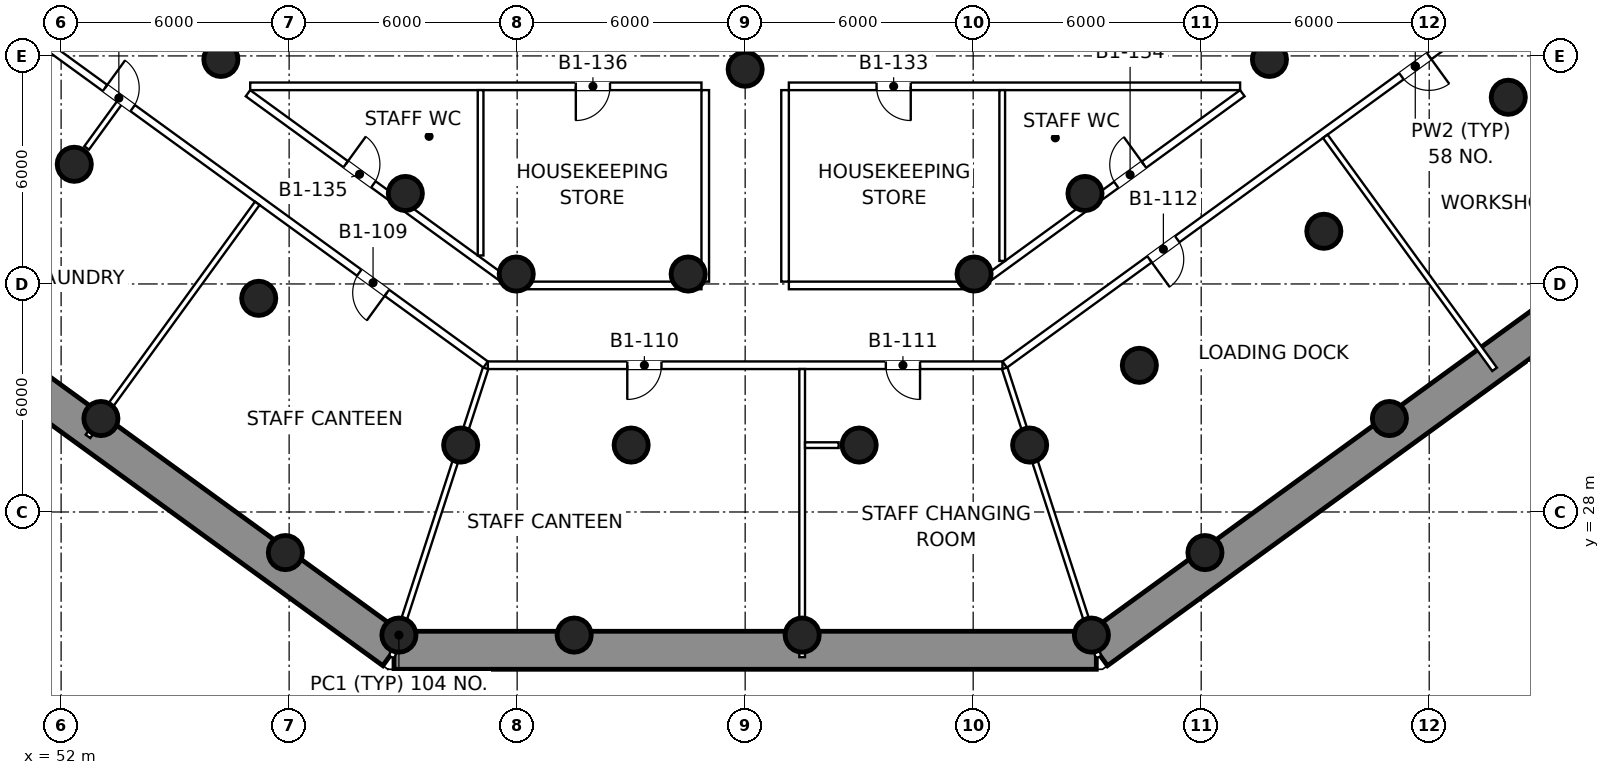
"""IFC4 building model, lengths in metres.
Left out: names, types, materials, properties, quantities, classifications, styles, units other than length and angle.
Written with IfcOpenShell. Run it as: python <this file> out.ifc"""

import sys

from ifc_helpers import new_model, si_unit, direction, frame, frame_2d, origin, origin_2d, place, context, subcontext, project, spatial, rectangle, circle, extrude, element, fill, save


model = new_model("IFC4")
c1 = context("Model", 3, precision=1e-05, world=origin(), true_north=direction((0.0, 1.0)))
c2 = subcontext(c1, "Body", "Model", "MODEL_VIEW")
j1 = project(units=[si_unit("LENGTHUNIT", "METRE"), si_unit("PLANEANGLEUNIT", "RADIAN")], contexts=[c1])
p1 = place(None, origin())
s1 = spatial("IfcSite", under=j1, at=p1, CompositionType="ELEMENT")
p2 = place(p1, origin())
s2 = spatial("IfcBuilding", under=s1, at=p2, CompositionType="ELEMENT")
p3 = place(p2, frame((0.0, 0.0, -5.0)))
s3 = spatial("IfcBuildingStorey", under=s2, at=p3, CompositionType="ELEMENT", Elevation=-5.0)
p4 = place(p3, frame((104.844, 42.963, 0.0), z_axis=(0.0, 0.0, 1.0), x_axis=(-0.809018883304, -0.587782652396, 0.0)))
e1 = element("IfcWall", 1, at=p4, inside=s3, PredefinedType="SOLIDWALL", context=c2, shape_type="SweptSolid", body=[
    extrude(rectangle(XDim=31.647, YDim=1.0, at=frame_2d((15.823, 0.0))), origin(), (0.0, 0.0, 1.0), 4.55),
])
p5 = place(p3, frame((79.24, 24.361, 0.0), z_axis=(0.0, 0.0, 1.0), x_axis=(-1.0, 0.0, 0.0)))
e2 = element("IfcWall", 2, at=p5, inside=s3, PredefinedType="SOLIDWALL", context=c2, shape_type="SweptSolid", body=[
    extrude(rectangle(XDim=18.481, YDim=1.0, at=frame_2d((9.24, 0.0))), origin(), (0.0, 0.0, 1.0), 4.55),
])
p6 = place(p3, frame((60.76, 24.361, 0.0), z_axis=(0.0, 0.0, 1.0), x_axis=(-0.809018883304, 0.587782652396, 0.0)))
e3 = element("IfcWall", 3, at=p6, inside=s3, PredefinedType="SOLIDWALL", context=c2, shape_type="SweptSolid", body=[
    extrude(rectangle(XDim=31.647, YDim=1.0, at=frame_2d((15.823, 0.0))), origin(), (0.0, 0.0, 1.0), 4.55),
])
for number, where, z_axis, x_axis in (
    (4, (70.0, 39.65, 0.0), (0.0, 0.0, 1.0), (1.0, 0.0, 0.0)),
    (5, (53.047, 30.459, 0.0), (0.0, 0.0, 1.0), (1.0, 0.0, 0.0)),
    (6, (57.901, 26.932, 0.0), (0.0, 0.0, 1.0), (1.0, 0.0, 0.0)),
    (7, (60.889, 24.761, 0.0), (0.0, 0.0, 1.0), (1.0, 0.0, 0.0)),
    (8, (65.5, 24.761, 0.0), (0.0, 0.0, 1.0), (1.0, 0.0, 0.0)),
    (9, (71.5, 24.761, 0.0), (0.0, 0.0, 1.0), (1.0, 0.0, 0.0)),
    (10, (79.111, 24.761, 0.0), (0.0, 0.0, 1.0), (1.0, 0.0, 0.0)),
    (11, (82.099, 26.932, 0.0), (0.0, 0.0, 1.0), (1.0, 0.0, 0.0)),
    (12, (86.953, 30.459, 0.0), (0.0, 0.0, 1.0), (1.0, 0.0, 0.0)),
    (13, (52.346, 37.149, 0.0), (0.0, 0.0, 1.0), (1.0, 0.0, 0.0)),
    (14, (57.2, 33.622, 0.0), (0.0, 0.0, 1.0), (1.0, 0.0, 0.0)),
    (15, (62.514, 29.761, 0.0), (0.0, 0.0, 1.0), (1.0, 0.0, 0.0)),
    (16, (67.0, 29.761, 0.0), (0.0, 0.0, 1.0), (1.0, 0.0, 0.0)),
    (17, (73.0, 29.761, 0.0), (0.0, 0.0, 1.0), (1.0, 0.0, 0.0)),
    (18, (77.486, 29.761, 0.0), (0.0, 0.0, 1.0), (1.0, 0.0, 0.0)),
    (19, (80.373, 31.859, 0.0), (0.0, 0.0, 1.0), (1.0, 0.0, 0.0)),
    (20, (85.227, 35.386, 0.0), (0.0, 0.0, 1.0), (1.0, 0.0, 0.0)),
    (21, (90.081, 38.912, 0.0), (0.0, 0.0, 1.0), (1.0, 0.0, 0.0)),
    (22, (56.204, 39.908, 0.0), (0.0, 0.0, 1.0), (1.0, 0.0, 0.0)),
    (23, (61.058, 36.381, 0.0), (0.0, 0.0, 1.0), (1.0, 0.0, 0.0)),
    (24, (63.976, 34.261, 0.0), (0.0, 0.0, 1.0), (1.0, 0.0, 0.0)),
    (25, (68.5, 34.261, 0.0), (0.0, 0.0, 1.0), (1.0, 0.0, 0.0)),
    (26, (76.024, 34.261, 0.0), (0.0, 0.0, 1.0), (1.0, 0.0, 0.0)),
    (27, (78.942, 36.381, 0.0), (0.0, 0.0, 1.0), (1.0, 0.0, 0.0)),
    (28, (83.796, 39.908, 0.0), (0.0, 0.0, 1.0), (1.0, 0.0, 0.0)),
):
    element("IfcColumn", number, at=place(p3, frame(where, z_axis=z_axis, x_axis=x_axis)), inside=s3, PredefinedType="COLUMN", context=c2, shape_type="SweptSolid", body=[
        extrude(circle(Radius=0.45, at=origin_2d()), origin(), (0.0, 0.0, 1.0), 5.0),
    ])
p7 = place(p3, frame((98.437, 47.579, 0.0), z_axis=(0.0, 0.0, 1.0), x_axis=(-0.809016646189, -0.587785731529, 0.0)))
e29 = element("IfcWall", 29, at=p7, inside=s3, PredefinedType="PARTITIONING", context=c2, shape_type="SweptSolid", body=[
    extrude(rectangle(XDim=26.708, YDim=0.2, at=frame_2d((13.354, 0.0))), origin(), (0.0, 0.0, 1.0), 4.55),
])
p8 = place(p7, frame((21.097, 0.0, 0.0)))
e30 = element("IfcOpeningElement", 30, at=p8, cuts=e29, PredefinedType="OPENING", context=c2, shape_type="SweptSolid", body=[
    extrude(rectangle(XDim=0.9, YDim=2.1, at=frame_2d((0.45, 1.05))), frame((0.0, 0.11, 0.0), z_axis=(0.0, -1.0, 0.0), x_axis=(1.0, 0.0, 0.0)), (0.0, 0.0, 1.0), 0.22),
])
p9 = place(p7, frame((12.904, 0.0, 0.0)))
e31 = element("IfcOpeningElement", 31, at=p9, cuts=e29, PredefinedType="OPENING", context=c2, shape_type="SweptSolid", body=[
    extrude(rectangle(XDim=0.9, YDim=2.1, at=frame_2d((0.45, 1.05))), frame((0.0, 0.11, 0.0), z_axis=(0.0, -1.0, 0.0), x_axis=(1.0, 0.0, 0.0)), (0.0, 0.0, 1.0), 0.22),
])
p10 = place(p7, frame((6.904, 0.0, 0.0)))
e32 = element("IfcOpeningElement", 32, at=p10, cuts=e29, PredefinedType="OPENING", context=c2, shape_type="SweptSolid", body=[
    extrude(rectangle(XDim=0.9, YDim=2.1, at=frame_2d((0.45, 1.05))), frame((0.0, 0.11, 0.0), z_axis=(0.0, -1.0, 0.0), x_axis=(1.0, 0.0, 0.0)), (0.0, 0.0, 1.0), 0.22),
])
p11 = place(p7, frame((1.711, 0.0, 0.0)))
e33 = element("IfcOpeningElement", 33, at=p11, cuts=e29, PredefinedType="OPENING", context=c2, shape_type="SweptSolid", body=[
    extrude(rectangle(XDim=0.9, YDim=2.1, at=frame_2d((0.45, 1.05))), frame((0.0, 0.11, 0.0), z_axis=(0.0, -1.0, 0.0), x_axis=(1.0, 0.0, 0.0)), (0.0, 0.0, 1.0), 0.22),
])
p12 = place(p3, frame((76.771, 31.861, 0.0), z_axis=(0.0, 0.0, 1.0), x_axis=(-1.0, 0.0, 0.0)))
e34 = element("IfcWall", 34, at=p12, inside=s3, PredefinedType="PARTITIONING", context=c2, shape_type="SweptSolid", body=[
    extrude(rectangle(XDim=13.542, YDim=0.2, at=frame_2d((6.771, 0.0))), origin(), (0.0, 0.0, 1.0), 4.55),
])
p13 = place(p12, frame((8.973, 0.0, 0.0)))
e35 = element("IfcOpeningElement", 35, at=p13, cuts=e34, PredefinedType="OPENING", context=c2, shape_type="SweptSolid", body=[
    extrude(rectangle(XDim=0.9, YDim=2.1, at=frame_2d((0.45, 1.05))), frame((0.0, 0.11, 0.0), z_axis=(0.0, -1.0, 0.0), x_axis=(1.0, 0.0, 0.0)), (0.0, 0.0, 1.0), 0.22),
])
p14 = place(p12, frame((2.169, 0.0, 0.0)))
e36 = element("IfcOpeningElement", 36, at=p14, cuts=e34, PredefinedType="OPENING", context=c2, shape_type="SweptSolid", body=[
    extrude(rectangle(XDim=0.9, YDim=2.1, at=frame_2d((0.45, 1.05))), frame((0.0, 0.11, 0.0), z_axis=(0.0, -1.0, 0.0), x_axis=(1.0, 0.0, 0.0)), (0.0, 0.0, 1.0), 0.22),
])
p15 = place(p3, frame((63.17, 31.88, 0.0), z_axis=(0.0, 0.0, 1.0), x_axis=(-0.809016646189, 0.587785731529, 0.0)))
e37 = element("IfcWall", 37, at=p15, inside=s3, PredefinedType="PARTITIONING", context=c2, shape_type="SweptSolid", body=[
    extrude(rectangle(XDim=26.708, YDim=0.2, at=frame_2d((13.354, 0.0))), origin(), (0.0, 0.0, 1.0), 4.55),
])
p16 = place(p15, frame((21.097, 0.0, 0.0)))
e38 = element("IfcOpeningElement", 38, at=p16, cuts=e37, PredefinedType="OPENING", context=c2, shape_type="SweptSolid", body=[
    extrude(rectangle(XDim=0.9, YDim=2.1, at=frame_2d((0.45, 1.05))), frame((0.0, 0.11, 0.0), z_axis=(0.0, -1.0, 0.0), x_axis=(1.0, 0.0, 0.0)), (0.0, 0.0, 1.0), 0.22),
])
p17 = place(p15, frame((11.479, 0.0, 0.0)))
e39 = element("IfcOpeningElement", 39, at=p17, cuts=e37, PredefinedType="OPENING", context=c2, shape_type="SweptSolid", body=[
    extrude(rectangle(XDim=0.9, YDim=2.1, at=frame_2d((0.45, 1.05))), frame((0.0, 0.11, 0.0), z_axis=(0.0, -1.0, 0.0), x_axis=(1.0, 0.0, 0.0)), (0.0, 0.0, 1.0), 0.22),
])
p18 = place(p15, frame((3.211, 0.0, 0.0)))
e40 = element("IfcOpeningElement", 40, at=p18, cuts=e37, PredefinedType="OPENING", context=c2, shape_type="SweptSolid", body=[
    extrude(rectangle(XDim=0.9, YDim=2.1, at=frame_2d((0.45, 1.05))), frame((0.0, 0.11, 0.0), z_axis=(0.0, -1.0, 0.0), x_axis=(1.0, 0.0, 0.0)), (0.0, 0.0, 1.0), 0.22),
])
p19 = place(p3, frame((76.148, 33.98, 0.0), z_axis=(0.0, 0.0, 1.0), x_axis=(0.809015553327, 0.58778723572, 0.0)))
e41 = element("IfcWall", 41, at=p19, inside=s3, PredefinedType="PARTITIONING", context=c2, shape_type="SweptSolid", body=[
    extrude(rectangle(XDim=8.573, YDim=0.2, at=frame_2d((4.286, 0.0))), origin(), (0.0, 0.0, 1.0), 3.85),
])
p20 = place(p19, frame((4.472, 0.0, 0.0)))
e42 = element("IfcOpeningElement", 42, at=p20, cuts=e41, PredefinedType="OPENING", context=c2, shape_type="SweptSolid", body=[
    extrude(rectangle(XDim=0.9, YDim=2.1, at=frame_2d((0.45, 1.05))), frame((0.0, 0.11, 0.0), z_axis=(0.0, -1.0, 0.0), x_axis=(1.0, 0.0, 0.0)), (0.0, 0.0, 1.0), 0.22),
])
p21 = place(p3, frame((83.024, 39.2, 0.0), z_axis=(0.0, 0.0, 1.0), x_axis=(-1.0, 0.0, 0.0)))
e43 = element("IfcWall", 43, at=p21, inside=s3, PredefinedType="PARTITIONING", context=c2, shape_type="SweptSolid", body=[
    extrude(rectangle(XDim=11.875, YDim=0.2, at=frame_2d((5.937, 0.0))), origin(), (0.0, 0.0, 1.0), 3.85),
])
p22 = place(p21, frame((8.667, 0.0, 0.0)))
e44 = element("IfcOpeningElement", 44, at=p22, cuts=e43, PredefinedType="OPENING", context=c2, shape_type="SweptSolid", body=[
    extrude(rectangle(XDim=0.9, YDim=2.1, at=frame_2d((0.45, 1.05))), frame((0.0, 0.11, 0.0), z_axis=(0.0, -1.0, 0.0), x_axis=(1.0, 0.0, 0.0)), (0.0, 0.0, 1.0), 0.22),
])
p23 = place(p3, frame((71.05, 39.1, 0.0), z_axis=(0.0, 0.0, 1.0), x_axis=(0.0, -1.0, 0.0)))
e45 = element("IfcWall", 45, at=p23, inside=s3, PredefinedType="PARTITIONING", context=c2, shape_type="SweptSolid", body=[
    extrude(rectangle(XDim=5.039, YDim=0.2, at=frame_2d((2.52, 0.0))), origin(), (0.0, 0.0, 1.0), 3.85),
])
p24 = place(p3, frame((71.15, 33.961, 0.0), z_axis=(0.0, 0.0, 1.0), x_axis=(1.0, 0.0, 0.0)))
e46 = element("IfcWall", 46, at=p24, inside=s3, PredefinedType="PARTITIONING", context=c2, shape_type="SweptSolid", body=[
    extrude(rectangle(XDim=4.939, YDim=0.2, at=frame_2d((2.469, 0.0))), origin(), (0.0, 0.0, 1.0), 3.85),
])
p25 = place(p3, frame((68.95, 34.061, 0.0), z_axis=(0.0, 0.0, 1.0), x_axis=(0.0, 1.0, 0.0)))
e47 = element("IfcWall", 47, at=p25, inside=s3, PredefinedType="PARTITIONING", context=c2, shape_type="SweptSolid", body=[
    extrude(rectangle(XDim=5.039, YDim=0.2, at=frame_2d((2.52, 0.0))), origin(), (0.0, 0.0, 1.0), 3.85),
])
p26 = place(p3, frame((68.85, 39.2, 0.0), z_axis=(0.0, 0.0, 1.0), x_axis=(-1.0, 0.0, 0.0)))
e48 = element("IfcWall", 48, at=p26, inside=s3, PredefinedType="PARTITIONING", context=c2, shape_type="SweptSolid", body=[
    extrude(rectangle(XDim=11.875, YDim=0.2, at=frame_2d((5.937, 0.0))), origin(), (0.0, 0.0, 1.0), 3.85),
])
p27 = place(p26, frame((2.406, 0.0, 0.0)))
e49 = element("IfcOpeningElement", 49, at=p27, cuts=e48, PredefinedType="OPENING", context=c2, shape_type="SweptSolid", body=[
    extrude(rectangle(XDim=0.9, YDim=2.1, at=frame_2d((0.45, 1.05))), frame((0.0, 0.11, 0.0), z_axis=(0.0, -1.0, 0.0), x_axis=(1.0, 0.0, 0.0)), (0.0, 0.0, 1.0), 0.22),
])
p28 = place(p3, frame((56.917, 39.019, 0.0), z_axis=(0.0, 0.0, 1.0), x_axis=(0.809015553327, -0.58778723572, 0.0)))
e50 = element("IfcWall", 50, at=p28, inside=s3, PredefinedType="PARTITIONING", context=c2, shape_type="SweptSolid", body=[
    extrude(rectangle(XDim=8.573, YDim=0.2, at=frame_2d((4.286, 0.0))), origin(), (0.0, 0.0, 1.0), 3.85),
])
p29 = place(p28, frame((3.179, 0.0, 0.0)))
e51 = element("IfcOpeningElement", 51, at=p29, cuts=e50, PredefinedType="OPENING", context=c2, shape_type="SweptSolid", body=[
    extrude(rectangle(XDim=0.9, YDim=2.1, at=frame_2d((0.45, 1.05))), frame((0.0, 0.11, 0.0), z_axis=(0.0, -1.0, 0.0), x_axis=(1.0, 0.0, 0.0)), (0.0, 0.0, 1.0), 0.22),
])
p30 = place(p3, frame((63.911, 33.961, 0.0), z_axis=(0.0, 0.0, 1.0), x_axis=(1.0, 0.0, 0.0)))
e52 = element("IfcWall", 52, at=p30, inside=s3, PredefinedType="PARTITIONING", context=c2, shape_type="SweptSolid", body=[
    extrude(rectangle(XDim=4.939, YDim=0.2, at=frame_2d((2.469, 0.0))), origin(), (0.0, 0.0, 1.0), 3.85),
])
for number, where, z_axis, x_axis in (
    (53, (60.701, 24.181, 0.0), (0.0, 0.0, 1.0), (0.309, 0.951, 0.0)),
    (54, (79.299, 24.181, 0.0), (0.0, 0.0, 1.0), (-0.309, 0.951, 0.0)),
):
    element("IfcWall", number, at=place(p3, frame(where, z_axis=z_axis, x_axis=x_axis)), inside=s3, PredefinedType="PARTITIONING", context=c2, shape_type="SweptSolid", body=[
        extrude(rectangle(XDim=7.99, YDim=0.15, at=frame_2d((3.995, 0.0))), origin(), (0.0, 0.0, 1.0), 4.55),
    ])
p31 = place(p3, frame((52.706, 29.99, 0.0), z_axis=(0.0, 0.0, 1.0), x_axis=(0.587800109381, 0.80900619986, 0.0)))
e55 = element("IfcWall", 55, at=p31, inside=s3, PredefinedType="PARTITIONING", context=c2, shape_type="SweptSolid", body=[
    extrude(rectangle(XDim=7.58, YDim=0.15, at=frame_2d((3.79, 0.0))), origin(), (0.0, 0.0, 1.0), 3.85),
])
for number, where, z_axis, x_axis in (
    (56, (71.5, 24.181, 0.0), (0.0, 0.0, 1.0), (0.0, 1.0, 0.0)),
    (57, (89.721, 31.753, 0.0), (0.0, 0.0, 1.0), (-0.588, 0.809, 0.0)),
    (58, (94.575, 35.28, 0.0), (0.0, 0.0, 1.0), (-0.588, 0.809, 0.0)),
):
    element("IfcWall", number, at=place(p3, frame(where, z_axis=z_axis, x_axis=x_axis)), inside=s3, PredefinedType="PARTITIONING", context=c2, shape_type="SweptSolid", body=[
        extrude(rectangle(XDim=7.58, YDim=0.15, at=frame_2d((3.79, 0.0))), origin(), (0.0, 0.0, 1.0), 3.85),
    ])
p32 = place(p3, frame((76.765, 34.607, 0.0), z_axis=(0.0, 0.0, 1.0), x_axis=(0.0, 1.0, 0.0)))
e59 = element("IfcWall", 59, at=p32, inside=s3, PredefinedType="PARTITIONING", context=c2, shape_type="SweptSolid", body=[
    extrude(rectangle(XDim=4.493, YDim=0.15, at=frame_2d((2.247, 0.0))), origin(), (0.0, 0.0, 1.0), 3.85),
])
p33 = place(p3, frame((63.038, 34.75, 0.0), z_axis=(0.0, 0.0, 1.0), x_axis=(0.0, 1.0, 0.0)))
e60 = element("IfcWall", 60, at=p33, inside=s3, PredefinedType="PARTITIONING", context=c2, shape_type="SweptSolid", body=[
    extrude(rectangle(XDim=4.35, YDim=0.15, at=frame_2d((2.175, 0.0))), origin(), (0.0, 0.0, 1.0), 3.85),
])
p34 = place(p3, frame((52.673, 37.579, 0.0), z_axis=(0.0, 0.0, 1.0), x_axis=(0.58775391966, 0.809039757938, 0.0)))
e61 = element("IfcWall", 61, at=p34, inside=s3, PredefinedType="PARTITIONING", context=c2, shape_type="SweptSolid", body=[
    extrude(rectangle(XDim=1.46, YDim=0.15, at=frame_2d((0.73, 0.0))), origin(), (0.0, 0.0, 1.0), 4.55),
])
p35 = place(p3, frame((72.46, 29.759, 0.0), z_axis=(0.0, 0.0, 1.0), x_axis=(-1.0, 0.0, 0.0)))
e62 = element("IfcWall", 62, at=p35, inside=s3, PredefinedType="PARTITIONING", context=c2, shape_type="SweptSolid", body=[
    extrude(rectangle(XDim=0.885, YDim=0.15, at=frame_2d((0.442, 0.0))), origin(), (0.0, 0.0, 1.0), 3.85),
])
p36 = place(p17, frame((0.9, 0.0, 0.0), z_axis=(0.0, 0.0, 1.0), x_axis=(-1.0, 0.0, 0.0)))
e63 = element("IfcDoor", 63, at=p36, inside=s3, OperationType="SINGLE_SWING_LEFT", PredefinedType="DOOR", context=c2, shape_type="SweptSolid", body=[
    extrude(rectangle(XDim=0.9, YDim=2.1, at=frame_2d((0.45, 1.05))), frame((0.0, 0.025, 0.0), z_axis=(0.0, -1.0, 0.0), x_axis=(1.0, 0.0, 0.0)), (0.0, 0.0, 1.0), 0.05),
])
fill(e39, e63)
p37 = place(p18, origin())
e64 = element("IfcDoor", 64, at=p37, inside=s3, OperationType="SINGLE_SWING_LEFT", PredefinedType="DOOR", context=c2, shape_type="SweptSolid", body=[
    extrude(rectangle(XDim=0.9, YDim=2.1, at=frame_2d((0.45, 1.05))), frame((0.0, 0.025, 0.0), z_axis=(0.0, -1.0, 0.0), x_axis=(1.0, 0.0, 0.0)), (0.0, 0.0, 1.0), 0.05),
])
fill(e40, e64)
p38 = place(p13, origin())
e65 = element("IfcDoor", 65, at=p38, inside=s3, OperationType="SINGLE_SWING_RIGHT", PredefinedType="DOOR", context=c2, shape_type="SweptSolid", body=[
    extrude(rectangle(XDim=0.9, YDim=2.1, at=frame_2d((0.45, 1.05))), frame((0.0, 0.025, 0.0), z_axis=(0.0, -1.0, 0.0), x_axis=(1.0, 0.0, 0.0)), (0.0, 0.0, 1.0), 0.05),
])
fill(e35, e65)
p39 = place(p14, origin())
e66 = element("IfcDoor", 66, at=p39, inside=s3, OperationType="SINGLE_SWING_LEFT", PredefinedType="DOOR", context=c2, shape_type="SweptSolid", body=[
    extrude(rectangle(XDim=0.9, YDim=2.1, at=frame_2d((0.45, 1.05))), frame((0.0, 0.025, 0.0), z_axis=(0.0, -1.0, 0.0), x_axis=(1.0, 0.0, 0.0)), (0.0, 0.0, 1.0), 0.05),
])
fill(e36, e66)
p40 = place(p8, origin())
e67 = element("IfcDoor", 67, at=p40, inside=s3, OperationType="SINGLE_SWING_RIGHT", PredefinedType="DOOR", context=c2, shape_type="SweptSolid", body=[
    extrude(rectangle(XDim=0.9, YDim=2.1, at=frame_2d((0.45, 1.05))), frame((0.0, 0.025, 0.0), z_axis=(0.0, -1.0, 0.0), x_axis=(1.0, 0.0, 0.0)), (0.0, 0.0, 1.0), 0.05),
])
fill(e30, e67)
p41 = place(p9, origin())
e68 = element("IfcDoor", 68, at=p41, inside=s3, OperationType="SINGLE_SWING_LEFT", PredefinedType="DOOR", context=c2, shape_type="SweptSolid", body=[
    extrude(rectangle(XDim=0.9, YDim=2.1, at=frame_2d((0.45, 1.05))), frame((0.0, 0.025, 0.0), z_axis=(0.0, -1.0, 0.0), x_axis=(1.0, 0.0, 0.0)), (0.0, 0.0, 1.0), 0.05),
])
fill(e31, e68)
p42 = place(p22, origin())
e69 = element("IfcDoor", 69, at=p42, inside=s3, OperationType="SINGLE_SWING_LEFT", PredefinedType="DOOR", context=c2, shape_type="SweptSolid", body=[
    extrude(rectangle(XDim=0.9, YDim=2.1, at=frame_2d((0.45, 1.05))), frame((0.0, 0.025, 0.0), z_axis=(0.0, -1.0, 0.0), x_axis=(1.0, 0.0, 0.0)), (0.0, 0.0, 1.0), 0.05),
])
fill(e44, e69)
p43 = place(p20, origin())
e70 = element("IfcDoor", 70, at=p43, inside=s3, OperationType="SINGLE_SWING_RIGHT", PredefinedType="DOOR", context=c2, shape_type="SweptSolid", body=[
    extrude(rectangle(XDim=0.9, YDim=2.1, at=frame_2d((0.45, 1.05))), frame((0.0, 0.025, 0.0), z_axis=(0.0, -1.0, 0.0), x_axis=(1.0, 0.0, 0.0)), (0.0, 0.0, 1.0), 0.05),
])
fill(e42, e70)
p44 = place(p29, origin())
e71 = element("IfcDoor", 71, at=p44, inside=s3, OperationType="SINGLE_SWING_LEFT", PredefinedType="DOOR", context=c2, shape_type="SweptSolid", body=[
    extrude(rectangle(XDim=0.9, YDim=2.1, at=frame_2d((0.45, 1.05))), frame((0.0, 0.025, 0.0), z_axis=(0.0, -1.0, 0.0), x_axis=(1.0, 0.0, 0.0)), (0.0, 0.0, 1.0), 0.05),
])
fill(e51, e71)
p45 = place(p27, origin())
e72 = element("IfcDoor", 72, at=p45, inside=s3, OperationType="SINGLE_SWING_RIGHT", PredefinedType="DOOR", context=c2, shape_type="SweptSolid", body=[
    extrude(rectangle(XDim=0.9, YDim=2.1, at=frame_2d((0.45, 1.05))), frame((0.0, 0.025, 0.0), z_axis=(0.0, -1.0, 0.0), x_axis=(1.0, 0.0, 0.0)), (0.0, 0.0, 1.0), 0.05),
])
fill(e49, e72)
save(model, sys.argv[1])
